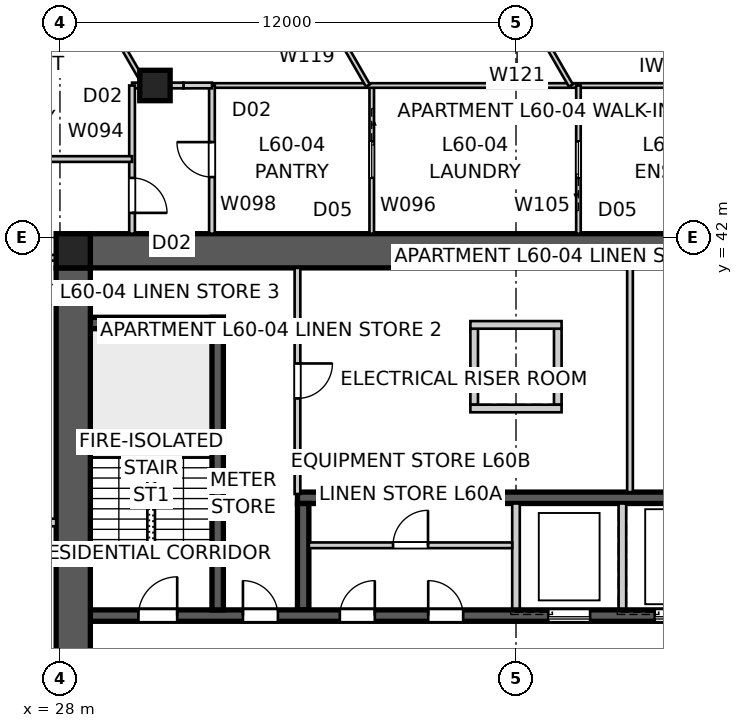
"""IFC4 building model, lengths in metres.
Left out: names, types, materials, properties, quantities, classifications, styles, units other than length and angle.
Written with IfcOpenShell. Run it as: python <this file> out.ifc"""

import sys

from ifc_helpers import new_model, si_unit, direction, frame, frame_2d, origin, origin_2d, place, context, subcontext, project, spatial, polyline, rectangle, outline, extrude, element, fill, save


model = new_model("IFC4")
c1 = context("Model", 3, precision=1e-05, world=origin(), true_north=direction((0.0, 1.0)))
c2 = subcontext(c1, "Body", "Model", "MODEL_VIEW")
j1 = project(units=[si_unit("LENGTHUNIT", "METRE"), si_unit("PLANEANGLEUNIT", "RADIAN")], contexts=[c1])
p1 = place(None, origin())
s1 = spatial("IfcSite", under=j1, at=p1, CompositionType="ELEMENT")
p2 = place(p1, origin())
s2 = spatial("IfcBuilding", under=s1, at=p2, CompositionType="ELEMENT")
p3 = place(p2, frame((0.0, 0.0, 218.4)))
s3 = spatial("IfcBuildingStorey", under=s2, at=p3, CompositionType="ELEMENT", Elevation=218.4)
p4 = place(p3, frame((28.8, 41.65, 0.0), z_axis=(0.0, 0.0, 1.0), x_axis=(1.0, 0.0, 0.0)))
e1 = element("IfcWall", 1, at=p4, inside=s3, PredefinedType="SHEAR", context=c2, shape_type="SweptSolid", body=[
    extrude(outline(polyline([(0.0, -0.45), (22.4, -0.45), (22.4, -0.025), (22.85, -0.025), (22.85, 0.025), (22.4, 0.025), (22.4, 0.45), (0.0, 0.45), (0.0, 0.025), (-0.45, 0.025), (-0.45, -0.025), (0.0, -0.025), (0.0, -0.45)])), origin(), (0.0, 0.0, 1.0), 3.4),
])
p5 = place(p3, frame((28.35, 41.2, 0.0), z_axis=(0.0, 0.0, 1.0), x_axis=(0.0, -1.0, 0.0)))
e2 = element("IfcWall", 2, at=p5, inside=s3, PredefinedType="SHEAR", context=c2, shape_type="SweptSolid", body=[
    extrude(outline(polyline([(0.0, -0.45), (22.4, -0.45), (22.4, -0.025), (22.85, -0.025), (22.85, 0.025), (22.4, 0.025), (22.4, 0.45), (0.0, 0.45), (0.0, 0.025), (-0.45, 0.025), (-0.45, -0.025), (0.0, -0.025), (0.0, -0.45)])), origin(), (0.0, 0.0, 1.0), 3.4),
])
p6 = place(p5, frame((11.14, 0.0, 0.0)))
e3 = element("IfcOpeningElement", 3, at=p6, cuts=e2, PredefinedType="OPENING", context=c2, shape_type="SweptSolid", body=[
    extrude(rectangle(XDim=1.02, YDim=2.4, at=frame_2d((0.51, 1.2))), frame((0.0, 0.46, 0.0), z_axis=(0.0, -1.0, 0.0), x_axis=(1.0, 0.0, 0.0)), (0.0, 0.0, 1.0), 0.92),
])
p7 = place(p3, frame((28.8, 32.05, 0.0), z_axis=(0.0, 0.0, 1.0), x_axis=(1.0, 0.0, 0.0)))
e4 = element("IfcWall", 4, at=p7, inside=s3, PredefinedType="SHEAR", context=c2, shape_type="SweptSolid", body=[
    extrude(rectangle(XDim=22.4, YDim=0.3, at=frame_2d((11.2, 0.0))), origin(), (0.0, 0.0, 1.0), 3.4),
])
p8 = place(p7, frame((19.04, 0.0, 0.0)))
e5 = element("IfcOpeningElement", 5, at=p8, cuts=e4, PredefinedType="OPENING", context=c2, shape_type="SweptSolid", body=[
    extrude(rectangle(XDim=0.92, YDim=2.1, at=frame_2d((0.46, 1.05))), frame((0.0, 0.16, 0.0), z_axis=(0.0, -1.0, 0.0), x_axis=(1.0, 0.0, 0.0)), (0.0, 0.0, 1.0), 0.32),
])
p9 = place(p7, frame((1.265, 0.0, 0.0)))
e6 = element("IfcOpeningElement", 6, at=p9, cuts=e4, PredefinedType="OPENING", context=c2, shape_type="SweptSolid", body=[
    extrude(rectangle(XDim=1.02, YDim=2.1, at=frame_2d((0.51, 1.05))), frame((0.0, 0.16, 0.0), z_axis=(0.0, -1.0, 0.0), x_axis=(1.0, 0.0, 0.0)), (0.0, 0.0, 1.0), 0.32),
])
p10 = place(p7, frame((4.015, 0.0, 0.0)))
e7 = element("IfcOpeningElement", 7, at=p10, cuts=e4, PredefinedType="OPENING", context=c2, shape_type="SweptSolid", body=[
    extrude(rectangle(XDim=0.92, YDim=2.1, at=frame_2d((0.46, 1.05))), frame((0.0, 0.16, 0.0), z_axis=(0.0, -1.0, 0.0), x_axis=(1.0, 0.0, 0.0)), (0.0, 0.0, 1.0), 0.32),
])
p11 = place(p7, frame((6.565, 0.0, 0.0)))
e8 = element("IfcOpeningElement", 8, at=p11, cuts=e4, PredefinedType="OPENING", context=c2, shape_type="SweptSolid", body=[
    extrude(rectangle(XDim=0.92, YDim=2.1, at=frame_2d((0.46, 1.05))), frame((0.0, 0.16, 0.0), z_axis=(0.0, -1.0, 0.0), x_axis=(1.0, 0.0, 0.0)), (0.0, 0.0, 1.0), 0.32),
])
p12 = place(p7, frame((8.89, 0.0, 0.0)))
e9 = element("IfcOpeningElement", 9, at=p12, cuts=e4, PredefinedType="OPENING", context=c2, shape_type="SweptSolid", body=[
    extrude(rectangle(XDim=0.92, YDim=2.1, at=frame_2d((0.46, 1.05))), frame((0.0, 0.16, 0.0), z_axis=(0.0, -1.0, 0.0), x_axis=(1.0, 0.0, 0.0)), (0.0, 0.0, 1.0), 0.32),
])
p13 = place(p7, frame((12.05, 0.0, 0.0)))
e10 = element("IfcOpeningElement", 10, at=p13, cuts=e4, PredefinedType="OPENING", context=c2, shape_type="SweptSolid", body=[
    extrude(rectangle(XDim=1.1, YDim=2.1, at=frame_2d((0.55, 1.05))), frame((0.0, 0.16, 0.0), z_axis=(0.0, -1.0, 0.0), x_axis=(1.0, 0.0, 0.0)), (0.0, 0.0, 1.0), 0.32),
])
p14 = place(p7, frame((14.85, 0.0, 0.0)))
e11 = element("IfcOpeningElement", 11, at=p14, cuts=e4, PredefinedType="OPENING", context=c2, shape_type="SweptSolid", body=[
    extrude(rectangle(XDim=1.1, YDim=2.1, at=frame_2d((0.55, 1.05))), frame((0.0, 0.16, 0.0), z_axis=(0.0, -1.0, 0.0), x_axis=(1.0, 0.0, 0.0)), (0.0, 0.0, 1.0), 0.32),
])
p15 = place(p3, frame((34.25, 35.15, 0.0), z_axis=(0.0, 0.0, 1.0), x_axis=(1.0, 0.0, 0.0)))
e12 = element("IfcWall", 12, at=p15, inside=s3, PredefinedType="SHEAR", context=c2, shape_type="SweptSolid", body=[
    extrude(rectangle(XDim=11.5, YDim=0.3, at=frame_2d((5.75, 0.0))), origin(), (0.0, 0.0, 1.0), 3.4),
])
p16 = place(p3, frame((34.4, 32.2, 0.0), z_axis=(0.0, 0.0, 1.0), x_axis=(0.0, 1.0, 0.0)))
e13 = element("IfcWall", 13, at=p16, inside=s3, PredefinedType="SHEAR", context=c2, shape_type="SweptSolid", body=[
    extrude(rectangle(XDim=2.8, YDim=0.3, at=frame_2d((1.4, 0.0))), origin(), (0.0, 0.0, 1.0), 3.4),
])
for number, where, z_axis, x_axis in (
    (14, (40.0, 32.2, 0.0), (0.0, 0.0, 1.0), (0.0, 1.0, 0.0)),
    (15, (42.8, 32.2, 0.0), (0.0, 0.0, 1.0), (0.0, 1.0, 0.0)),
):
    element("IfcWall", number, at=place(p3, frame(where, z_axis=z_axis, x_axis=x_axis)), inside=s3, PredefinedType="SOLIDWALL", context=c2, shape_type="SweptSolid", body=[
        extrude(rectangle(XDim=2.8, YDim=0.2, at=frame_2d((1.4, 0.0))), origin(), (0.0, 0.0, 1.0), 3.4),
    ])
p17 = place(p3, frame((32.15, 32.2, 0.0), z_axis=(0.0, 0.0, 1.0), x_axis=(0.0, 1.0, 0.0)))
e16 = element("IfcWall", 16, at=p17, inside=s3, PredefinedType="SHEAR", context=c2, shape_type="SweptSolid", body=[
    extrude(rectangle(XDim=7.7, YDim=0.3, at=frame_2d((3.85, 0.0))), origin(), (0.0, 0.0, 1.0), 3.4),
])
p18 = place(p3, frame((28.8, 39.75, 0.0), z_axis=(0.0, 0.0, 1.0), x_axis=(1.0, 0.0, 0.0)))
e17 = element("IfcWall", 17, at=p18, inside=s3, PredefinedType="SHEAR", context=c2, shape_type="SweptSolid", body=[
    extrude(rectangle(XDim=3.5, YDim=0.3, at=frame_2d((1.75, 0.0))), origin(), (0.0, 0.0, 1.0), 3.4),
])
for number, where, z_axis, x_axis in (
    (18, (38.9, 37.6, 0.0), (0.0, 0.0, 1.0), (0.0, 1.0, 0.0)),
    (19, (41.1, 37.6, 0.0), (0.0, 0.0, 1.0), (0.0, 1.0, 0.0)),
):
    element("IfcWall", number, at=place(p3, frame(where, z_axis=z_axis, x_axis=x_axis)), inside=s3, PredefinedType="SOLIDWALL", context=c2, shape_type="SweptSolid", body=[
        extrude(rectangle(XDim=2.0, YDim=0.2, at=frame_2d((1.0, 0.0))), origin(), (0.0, 0.0, 1.0), 3.4),
    ])
for number, where, z_axis, x_axis in (
    (20, (38.8, 37.5, 0.0), (0.0, 0.0, 1.0), (1.0, 0.0, 0.0)),
    (21, (38.8, 39.7, 0.0), (0.0, 0.0, 1.0), (1.0, 0.0, 0.0)),
):
    element("IfcWall", number, at=place(p3, frame(where, z_axis=z_axis, x_axis=x_axis)), inside=s3, PredefinedType="SOLIDWALL", context=c2, shape_type="SweptSolid", body=[
        extrude(rectangle(XDim=2.4, YDim=0.2, at=frame_2d((1.2, 0.0))), origin(), (0.0, 0.0, 1.0), 3.4),
    ])
p19 = place(p3, frame((28.35, 41.65, 0.0), z_axis=(0.0, 0.0, 1.0), x_axis=(1.0, 0.0, 0.0)))
e22 = element("IfcColumn", 22, at=p19, inside=s3, PredefinedType="COLUMN", context=c2, shape_type="SweptSolid", body=[
    extrude(rectangle(XDim=0.9, YDim=0.9, at=origin_2d()), origin(), (0.0, 0.0, 1.0), 3.4),
])
p20 = place(p3, frame((30.5, 46.0, 0.0), z_axis=(0.0, 0.0, 1.0), x_axis=(1.0, 0.0, 0.0)))
e23 = element("IfcColumn", 23, at=p20, inside=s3, PredefinedType="COLUMN", context=c2, shape_type="SweptSolid", body=[
    extrude(rectangle(XDim=0.8, YDim=0.8, at=origin_2d()), origin(), (0.0, 0.0, 1.0), 3.4),
])
p21 = place(p3, frame((27.9, 34.5, 0.0), z_axis=(0.0, 0.0, 1.0), x_axis=(-1.0, 0.0, 0.0)))
e24 = element("IfcWall", 24, at=p21, inside=s3, PredefinedType="PARTITIONING", context=c2, shape_type="SweptSolid", body=[
    extrude(rectangle(XDim=2.5, YDim=0.2, at=frame_2d((1.25, 0.0))), origin(), (0.0, 0.0, 1.0), 3.25),
])
p22 = place(p3, frame((34.25, 41.2, 0.0), z_axis=(0.0, 0.0, 1.0), x_axis=(0.0, -1.0, 0.0)))
e25 = element("IfcWall", 25, at=p22, inside=s3, PredefinedType="SOLIDWALL", context=c2, shape_type="SweptSolid", body=[
    extrude(rectangle(XDim=5.95, YDim=0.15, at=frame_2d((2.975, 0.0))), origin(), (0.0, 0.0, 1.0), 3.25),
])
p23 = place(p22, frame((2.515, 0.0, 0.0)))
e26 = element("IfcOpeningElement", 26, at=p23, cuts=e25, PredefinedType="OPENING", context=c2, shape_type="SweptSolid", body=[
    extrude(rectangle(XDim=0.92, YDim=2.1, at=frame_2d((0.46, 1.05))), frame((0.0, 0.085, 0.0), z_axis=(0.0, -1.0, 0.0), x_axis=(1.0, 0.0, 0.0)), (0.0, 0.0, 1.0), 0.17),
])
p24 = place(p3, frame((43.0, 41.2, 0.0), z_axis=(0.0, 0.0, 1.0), x_axis=(0.0, -1.0, 0.0)))
e27 = element("IfcWall", 27, at=p24, inside=s3, PredefinedType="SOLIDWALL", context=c2, shape_type="SweptSolid", body=[
    extrude(rectangle(XDim=5.9, YDim=0.15, at=frame_2d((2.95, 0.0))), origin(), (0.0, 0.0, 1.0), 3.25),
])
p25 = place(p3, frame((24.0, 41.467, 0.0), z_axis=(0.0, 0.0, 1.0), x_axis=(1.0, 0.0, 0.0)))
e28 = element("IfcWall", 28, at=p25, inside=s3, PredefinedType="SOLIDWALL", context=c2, shape_type="SweptSolid", body=[
    extrude(rectangle(XDim=4.82, YDim=0.15, at=frame_2d((2.41, 0.0))), origin(), (0.0, 0.0, 1.0), 3.25),
])
p26 = place(p25, frame((1.49, 0.0, 0.0)))
e29 = element("IfcOpeningElement", 29, at=p26, cuts=e28, PredefinedType="OPENING", context=c2, shape_type="SweptSolid", body=[
    extrude(rectangle(XDim=0.92, YDim=2.1, at=frame_2d((0.46, 1.05))), frame((0.0, 0.085, 0.0), z_axis=(0.0, -1.0, 0.0), x_axis=(1.0, 0.0, 0.0)), (0.0, 0.0, 1.0), 0.17),
])
p27 = place(p3, frame((28.38, 49.226, 0.0), z_axis=(0.0, 0.0, 1.0), x_axis=(0.499973989716, -0.866040420308, 0.0)))
e30 = element("IfcWall", 30, at=p27, inside=s3, PredefinedType="PARTITIONING", context=c2, shape_type="SweptSolid", body=[
    extrude(rectangle(XDim=3.725, YDim=0.12, at=frame_2d((1.862, 0.0))), origin(), (0.0, 0.0, 1.0), 3.25),
])
p28 = place(p27, frame((1.682, 0.0, 0.0)))
e31 = element("IfcOpeningElement", 31, at=p28, cuts=e30, PredefinedType="OPENING", context=c2, shape_type="SweptSolid", body=[
    extrude(rectangle(XDim=0.92, YDim=2.34, at=frame_2d((0.46, 1.17))), frame((0.0, 0.07, 0.0), z_axis=(0.0, -1.0, 0.0), x_axis=(1.0, 0.0, 0.0)), (0.0, 0.0, 1.0), 0.14),
])
p29 = place(p3, frame((30.633, 46.0, 0.0), z_axis=(0.0, 0.0, 1.0), x_axis=(-1.0, 0.0, 0.0)))
e32 = element("IfcWall", 32, at=p29, inside=s3, PredefinedType="SOLIDWALL", context=c2, shape_type="SweptSolid", body=[
    extrude(rectangle(XDim=0.735, YDim=0.15, at=frame_2d((0.368, 0.0))), origin(), (0.0, 0.0, 1.0), 3.25),
])
p30 = place(p3, frame((29.897, 46.0, 0.0), z_axis=(0.0, 0.0, 1.0), x_axis=(0.0, -1.0, 0.0)))
e33 = element("IfcWall", 33, at=p30, inside=s3, PredefinedType="SOLIDWALL", context=c2, shape_type="SweptSolid", body=[
    extrude(rectangle(XDim=3.9, YDim=0.15, at=frame_2d((1.95, 0.0))), origin(), (0.0, 0.0, 1.0), 3.25),
])
p31 = place(p30, frame((2.433, 0.0, 0.0)))
e34 = element("IfcOpeningElement", 34, at=p31, cuts=e33, PredefinedType="OPENING", context=c2, shape_type="SweptSolid", body=[
    extrude(rectangle(XDim=0.92, YDim=2.34, at=frame_2d((0.46, 1.17))), frame((0.0, 0.085, 0.0), z_axis=(0.0, -1.0, 0.0), x_axis=(1.0, 0.0, 0.0)), (0.0, 0.0, 1.0), 0.17),
])
p32 = place(p3, frame((29.897, 44.065, 0.0), z_axis=(0.0, 0.0, 1.0), x_axis=(-1.0, 0.0, 0.0)))
e35 = element("IfcWall", 35, at=p32, inside=s3, PredefinedType="SOLIDWALL", context=c2, shape_type="SweptSolid", body=[
    extrude(rectangle(XDim=5.897, YDim=0.15, at=frame_2d((2.949, 0.0))), origin(), (0.0, 0.0, 1.0), 3.25),
])
p33 = place(p3, frame((36.204, 46.0, 0.0), z_axis=(0.0, 0.0, 1.0), x_axis=(0.0, -1.0, 0.0)))
e36 = element("IfcWall", 36, at=p33, inside=s3, PredefinedType="PARTITIONING", context=c2, shape_type="SweptSolid", body=[
    extrude(rectangle(XDim=3.9, YDim=0.12, at=frame_2d((1.95, 0.0))), origin(), (0.0, 0.0, 1.0), 3.25),
])
p34 = place(p33, frame((1.47, 0.0, 0.0)))
e37 = element("IfcOpeningElement", 37, at=p34, cuts=e36, PredefinedType="OPENING", context=c2, shape_type="SweptSolid", body=[
    extrude(rectangle(XDim=0.96, YDim=2.1, at=frame_2d((0.48, 1.05))), frame((0.0, 0.07, 0.0), z_axis=(0.0, -1.0, 0.0), x_axis=(1.0, 0.0, 0.0)), (0.0, 0.0, 1.0), 0.14),
])
p35 = place(p3, frame((32.0, 46.0, 0.0), z_axis=(0.0, 0.0, 1.0), x_axis=(1.0, 0.0, 0.0)))
e38 = element("IfcWall", 38, at=p35, inside=s3, PredefinedType="PARTITIONING", context=c2, shape_type="SweptSolid", body=[
    extrude(rectangle(XDim=17.213, YDim=0.12, at=frame_2d((8.607, 0.0))), origin(), (0.0, 0.0, 1.0), 3.25),
])
p36 = place(p3, frame((32.0, 42.1, 0.0), z_axis=(0.0, 0.0, 1.0), x_axis=(0.0, 1.0, 0.0)))
e39 = element("IfcWall", 39, at=p36, inside=s3, PredefinedType="SOLIDWALL", context=c2, shape_type="SweptSolid", body=[
    extrude(rectangle(XDim=3.9, YDim=0.15, at=frame_2d((1.95, 0.0))), origin(), (0.0, 0.0, 1.0), 3.25),
])
p37 = place(p36, frame((1.49, 0.0, 0.0)))
e40 = element("IfcOpeningElement", 40, at=p37, cuts=e39, PredefinedType="OPENING", context=c2, shape_type="SweptSolid", body=[
    extrude(rectangle(XDim=0.92, YDim=2.34, at=frame_2d((0.46, 1.17))), frame((0.0, 0.085, 0.0), z_axis=(0.0, -1.0, 0.0), x_axis=(1.0, 0.0, 0.0)), (0.0, 0.0, 1.0), 0.17),
])
p38 = place(p3, frame((41.644, 42.1, 0.0), z_axis=(0.0, 0.0, 1.0), x_axis=(0.0, 1.0, 0.0)))
e41 = element("IfcWall", 41, at=p38, inside=s3, PredefinedType="PARTITIONING", context=c2, shape_type="SweptSolid", body=[
    extrude(rectangle(XDim=3.9, YDim=0.12, at=frame_2d((1.95, 0.0))), origin(), (0.0, 0.0, 1.0), 3.25),
])
p39 = place(p38, frame((1.47, 0.0, 0.0)))
e42 = element("IfcOpeningElement", 42, at=p39, cuts=e41, PredefinedType="OPENING", context=c2, shape_type="SweptSolid", body=[
    extrude(rectangle(XDim=0.96, YDim=2.1, at=frame_2d((0.48, 1.05))), frame((0.0, 0.07, 0.0), z_axis=(0.0, -1.0, 0.0), x_axis=(1.0, 0.0, 0.0)), (0.0, 0.0, 1.0), 0.14),
])
p40 = place(p3, frame((36.103, 46.0, 0.0), z_axis=(0.0, 0.0, 1.0), x_axis=(-0.500013541994, 0.866017585169, 0.0)))
e43 = element("IfcWall", 43, at=p40, inside=s3, PredefinedType="PARTITIONING", context=c2, shape_type="SweptSolid", body=[
    extrude(rectangle(XDim=6.655, YDim=0.12, at=frame_2d((3.328, 0.0))), origin(), (0.0, 0.0, 1.0), 3.25),
])
p41 = place(p40, frame((2.887, 0.0, 0.0)))
e44 = element("IfcOpeningElement", 44, at=p41, cuts=e43, PredefinedType="OPENING", context=c2, shape_type="SweptSolid", body=[
    extrude(rectangle(XDim=0.92, YDim=2.34, at=frame_2d((0.46, 1.17))), frame((0.0, 0.07, 0.0), z_axis=(0.0, -1.0, 0.0), x_axis=(1.0, 0.0, 0.0)), (0.0, 0.0, 1.0), 0.14),
])
p42 = place(p3, frame((40.584, 47.488, 0.0), z_axis=(0.0, 0.0, 1.0), x_axis=(0.500005339912, -0.866022320763, 0.0)))
e45 = element("IfcWall", 45, at=p42, inside=s3, PredefinedType="PARTITIONING", context=c2, shape_type="SweptSolid", body=[
    extrude(rectangle(XDim=1.718, YDim=0.12, at=frame_2d((0.859, 0.0))), origin(), (0.0, 0.0, 1.0), 3.25),
])
p43 = place(p3, frame((32.0, 46.0, 0.0), z_axis=(0.0, 0.0, 1.0), x_axis=(-1.0, 0.0, 0.0)))
e46 = element("IfcWall", 46, at=p43, inside=s3, PredefinedType="SOLIDWALL", context=c2, shape_type="SweptSolid", body=[
    extrude(rectangle(XDim=0.75, YDim=0.15, at=frame_2d((0.375, 0.0))), origin(), (0.0, 0.0, 1.0), 3.25),
])
p44 = place(p3, frame((31.25, 46.0, 0.0), z_axis=(0.0, 0.0, 1.0), x_axis=(-1.0, 0.0, 0.0)))
e47 = element("IfcWall", 47, at=p44, inside=s3, PredefinedType="SOLIDWALL", context=c2, shape_type="SweptSolid", body=[
    extrude(rectangle(XDim=0.545, YDim=0.15, at=frame_2d((0.273, 0.0))), origin(), (0.0, 0.0, 1.0), 2.55),
])
p45 = place(p3, frame((34.55, 33.9, 0.0), z_axis=(0.0, 0.0, 1.0), x_axis=(1.0, 0.0, 0.0)))
e48 = element("IfcWall", 48, at=p45, inside=s3, PredefinedType="SOLIDWALL", context=c2, shape_type="SweptSolid", body=[
    extrude(rectangle(XDim=5.35, YDim=0.15, at=frame_2d((2.675, 0.0))), origin(), (0.0, 0.0, 1.0), 3.25),
])
p46 = place(p45, frame((2.215, 0.0, 0.0)))
e49 = element("IfcOpeningElement", 49, at=p46, cuts=e48, PredefinedType="OPENING", context=c2, shape_type="SweptSolid", body=[
    extrude(rectangle(XDim=0.92, YDim=2.1, at=frame_2d((0.46, 1.05))), frame((0.0, 0.085, 0.0), z_axis=(0.0, -1.0, 0.0), x_axis=(1.0, 0.0, 0.0)), (0.0, 0.0, 1.0), 0.17),
])
p47 = place(p9, origin())
e50 = element("IfcDoor", 50, at=p47, inside=s3, OperationType="SINGLE_SWING_RIGHT", PredefinedType="DOOR", context=c2, shape_type="SweptSolid", body=[
    extrude(rectangle(XDim=1.02, YDim=2.1, at=frame_2d((0.51, 1.05))), frame((0.0, 0.025, 0.0), z_axis=(0.0, -1.0, 0.0), x_axis=(1.0, 0.0, 0.0)), (0.0, 0.0, 1.0), 0.05),
])
fill(e6, e50)
p48 = place(p10, origin())
e51 = element("IfcDoor", 51, at=p48, inside=s3, OperationType="SINGLE_SWING_LEFT", PredefinedType="DOOR", context=c2, shape_type="SweptSolid", body=[
    extrude(rectangle(XDim=0.92, YDim=2.1, at=frame_2d((0.46, 1.05))), frame((0.0, 0.025, 0.0), z_axis=(0.0, -1.0, 0.0), x_axis=(1.0, 0.0, 0.0)), (0.0, 0.0, 1.0), 0.05),
])
fill(e7, e51)
p49 = place(p23, origin())
e52 = element("IfcDoor", 52, at=p49, inside=s3, OperationType="SINGLE_SWING_LEFT", PredefinedType="DOOR", context=c2, shape_type="SweptSolid", body=[
    extrude(rectangle(XDim=0.92, YDim=2.1, at=frame_2d((0.46, 1.05))), frame((0.0, 0.025, 0.0), z_axis=(0.0, -1.0, 0.0), x_axis=(1.0, 0.0, 0.0)), (0.0, 0.0, 1.0), 0.05),
])
fill(e26, e52)
p50 = place(p31, origin())
e53 = element("IfcDoor", 53, at=p50, inside=s3, OperationType="SINGLE_SWING_RIGHT", PredefinedType="DOOR", context=c2, shape_type="SweptSolid", body=[
    extrude(rectangle(XDim=0.92, YDim=2.34, at=frame_2d((0.46, 1.17))), frame((0.0, 0.025, 0.0), z_axis=(0.0, -1.0, 0.0), x_axis=(1.0, 0.0, 0.0)), (0.0, 0.0, 1.0), 0.05),
])
fill(e34, e53)
p51 = place(p37, origin())
e54 = element("IfcDoor", 54, at=p51, inside=s3, OperationType="SINGLE_SWING_RIGHT", PredefinedType="DOOR", context=c2, shape_type="SweptSolid", body=[
    extrude(rectangle(XDim=0.92, YDim=2.34, at=frame_2d((0.46, 1.17))), frame((0.0, 0.025, 0.0), z_axis=(0.0, -1.0, 0.0), x_axis=(1.0, 0.0, 0.0)), (0.0, 0.0, 1.0), 0.05),
])
fill(e40, e54)
p52 = place(p34, origin())
e55 = element("IfcDoor", 55, at=p52, inside=s3, OperationType="SLIDING_TO_LEFT", PredefinedType="DOOR", context=c2, shape_type="SweptSolid", body=[
    extrude(rectangle(XDim=0.96, YDim=2.1, at=frame_2d((0.48, 1.05))), frame((0.0, 0.025, 0.0), z_axis=(0.0, -1.0, 0.0), x_axis=(1.0, 0.0, 0.0)), (0.0, 0.0, 1.0), 0.05),
])
fill(e37, e55)
p53 = place(p39, origin())
e56 = element("IfcDoor", 56, at=p53, inside=s3, OperationType="SLIDING_TO_LEFT", PredefinedType="DOOR", context=c2, shape_type="SweptSolid", body=[
    extrude(rectangle(XDim=0.96, YDim=2.1, at=frame_2d((0.48, 1.05))), frame((0.0, 0.025, 0.0), z_axis=(0.0, -1.0, 0.0), x_axis=(1.0, 0.0, 0.0)), (0.0, 0.0, 1.0), 0.05),
])
fill(e42, e56)
p54 = place(p11, origin())
e57 = element("IfcDoor", 57, at=p54, inside=s3, OperationType="SINGLE_SWING_RIGHT", PredefinedType="DOOR", context=c2, shape_type="SweptSolid", body=[
    extrude(rectangle(XDim=0.92, YDim=2.1, at=frame_2d((0.46, 1.05))), frame((0.0, 0.025, 0.0), z_axis=(0.0, -1.0, 0.0), x_axis=(1.0, 0.0, 0.0)), (0.0, 0.0, 1.0), 0.05),
])
fill(e8, e57)
p55 = place(p12, origin())
e58 = element("IfcDoor", 58, at=p55, inside=s3, OperationType="SINGLE_SWING_LEFT", PredefinedType="DOOR", context=c2, shape_type="SweptSolid", body=[
    extrude(rectangle(XDim=0.92, YDim=2.1, at=frame_2d((0.46, 1.05))), frame((0.0, 0.025, 0.0), z_axis=(0.0, -1.0, 0.0), x_axis=(1.0, 0.0, 0.0)), (0.0, 0.0, 1.0), 0.05),
])
fill(e9, e58)
p56 = place(p46, origin())
e59 = element("IfcDoor", 59, at=p56, inside=s3, OperationType="SINGLE_SWING_RIGHT", PredefinedType="DOOR", context=c2, shape_type="SweptSolid", body=[
    extrude(rectangle(XDim=0.92, YDim=2.1, at=frame_2d((0.46, 1.05))), frame((0.0, 0.025, 0.0), z_axis=(0.0, -1.0, 0.0), x_axis=(1.0, 0.0, 0.0)), (0.0, 0.0, 1.0), 0.05),
])
fill(e49, e59)
p57 = place(p13, origin())
e60 = element("IfcDoor", 60, at=p57, inside=s3, OperationType="SLIDING_TO_LEFT", PredefinedType="DOOR", context=c2, shape_type="SweptSolid", body=[
    extrude(rectangle(XDim=1.1, YDim=2.1, at=frame_2d((0.55, 1.05))), frame((0.0, 0.025, 0.0), z_axis=(0.0, -1.0, 0.0), x_axis=(1.0, 0.0, 0.0)), (0.0, 0.0, 1.0), 0.05),
])
fill(e10, e60)
p58 = place(p14, origin())
e61 = element("IfcDoor", 61, at=p58, inside=s3, OperationType="SLIDING_TO_LEFT", PredefinedType="DOOR", context=c2, shape_type="SweptSolid", body=[
    extrude(rectangle(XDim=1.1, YDim=2.1, at=frame_2d((0.55, 1.05))), frame((0.0, 0.025, 0.0), z_axis=(0.0, -1.0, 0.0), x_axis=(1.0, 0.0, 0.0)), (0.0, 0.0, 1.0), 0.05),
])
fill(e11, e61)
save(model, sys.argv[1])
